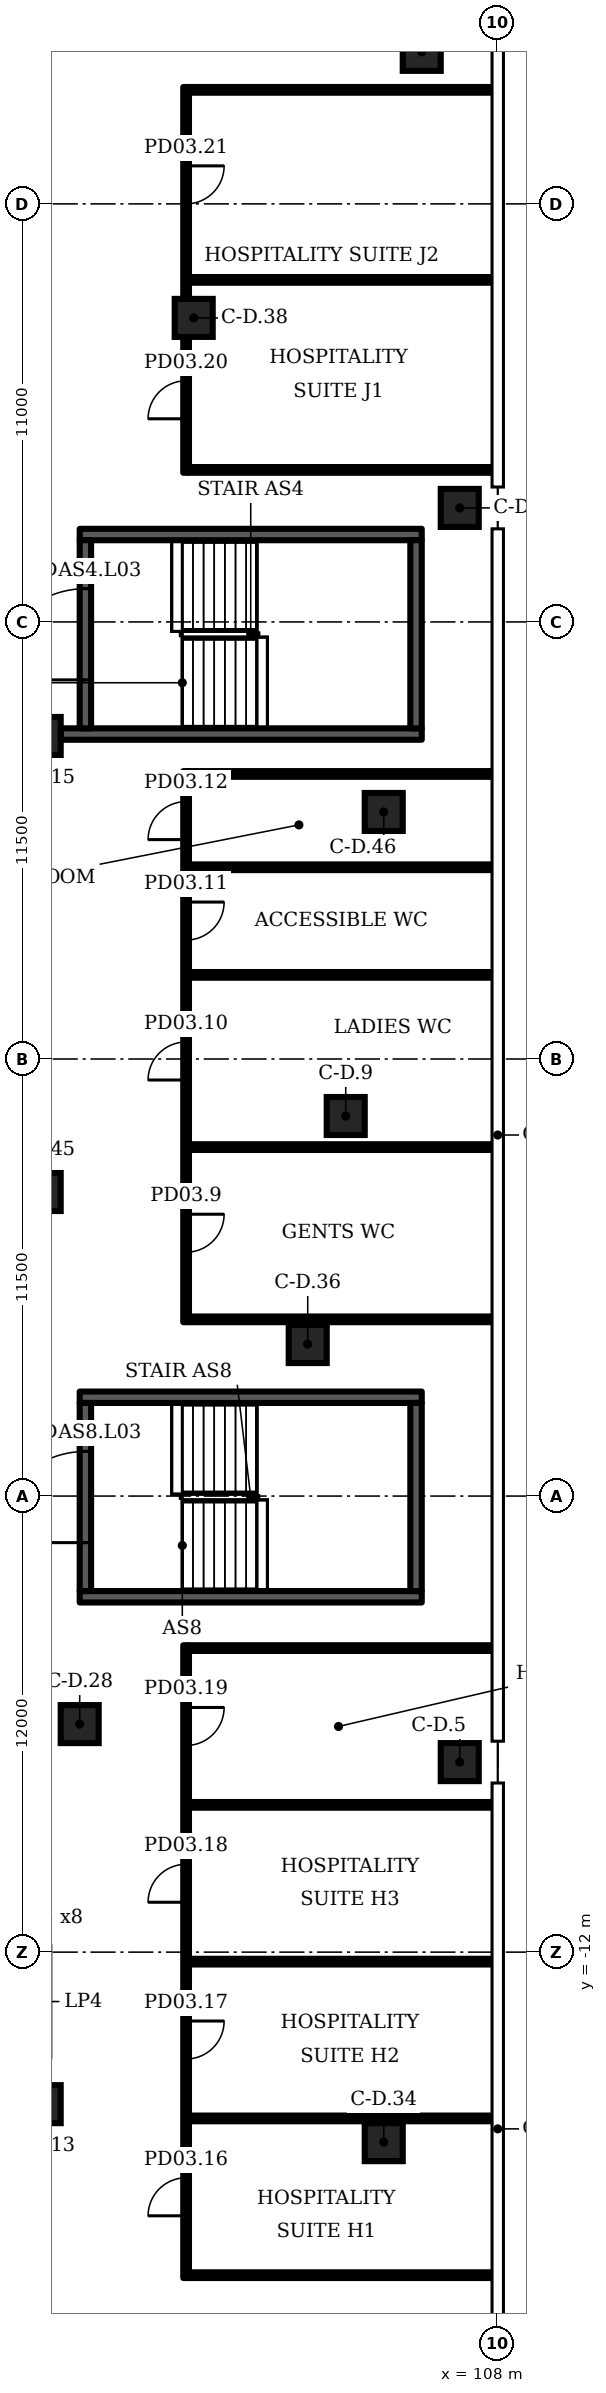
"""IFC4 building model, lengths in metres.
Left out: names, types, materials, properties, quantities, classifications, styles, units other than length and angle.
Written with IfcOpenShell. Run it as: python <this file> out.ifc"""

import sys

from ifc_helpers import new_model, si_unit, direction, frame, frame_2d, origin, origin_2d, place, context, subcontext, project, spatial, rectangle, extrude, element, fill, save


model = new_model("IFC4")
c1 = context("Model", 3, precision=1e-05, world=origin(), true_north=direction((0.0, 1.0)))
c2 = subcontext(c1, "Body", "Model", "MODEL_VIEW")
j1 = project(units=[si_unit("LENGTHUNIT", "METRE"), si_unit("PLANEANGLEUNIT", "RADIAN")], contexts=[c1])
p1 = place(None, origin())
s1 = spatial("IfcSite", under=j1, at=p1, CompositionType="ELEMENT")
p2 = place(p1, origin())
s2 = spatial("IfcBuilding", under=s1, at=p2, CompositionType="ELEMENT")
p3 = place(p2, frame((0.0, 0.0, 21.5)))
s3 = spatial("IfcBuildingStorey", under=s2, at=p3, CompositionType="ELEMENT", Elevation=21.5)
for number, where, z_axis, x_axis in (
    (1, (107.0, 26.0, 0.0), (0.0, 0.0, 1.0), (1.0, 0.0, 0.0)),
    (2, (107.0, -7.0, 0.0), (0.0, 0.0, 1.0), (1.0, 0.0, 0.0)),
    (3, (104.0, 10.0, 0.0), (0.0, 0.0, 1.0), (1.0, 0.0, 0.0)),
    (4, (96.0, -16.0, 0.0), (0.0, 0.0, 1.0), (1.0, 0.0, 0.0)),
    (5, (96.0, 20.0, 0.0), (0.0, 0.0, 1.0), (1.0, 0.0, 0.0)),
    (6, (106.0, 38.0, 0.0), (0.0, 0.0, 1.0), (1.0, 0.0, 0.0)),
    (7, (97.0, -6.0, 0.0), (0.0, 0.0, 1.0), (1.0, 0.0, 0.0)),
    (8, (105.0, -17.0, 0.0), (0.0, 0.0, 1.0), (1.0, 0.0, 0.0)),
    (9, (103.0, 4.0, 0.0), (0.0, 0.0, 1.0), (1.0, 0.0, 0.0)),
    (10, (100.0, 31.0, 0.0), (0.0, 0.0, 1.0), (1.0, 0.0, 0.0)),
    (11, (96.0, 8.0, 0.0), (0.0, 0.0, 1.0), (1.0, 0.0, 0.0)),
    (12, (105.0, 18.0, 0.0), (0.0, 0.0, 1.0), (1.0, 0.0, 0.0)),
):
    element("IfcColumn", number, at=place(p3, frame(where, z_axis=z_axis, x_axis=x_axis)), inside=s3, PredefinedType="COLUMN", context=c2, shape_type="SweptSolid", body=[
        extrude(rectangle(XDim=1.0, YDim=1.0, at=origin_2d()), origin(), (0.0, 0.0, 1.0), 6.0),
    ])
for number, where, z_axis, x_axis in (
    (13, (99.875, -20.5, 0.0), (0.0, 0.0, 1.0), (1.0, 0.0, 0.0)),
    (14, (99.875, -16.375, 0.0), (0.0, 0.0, 1.0), (1.0, 0.0, 0.0)),
    (15, (99.875, -12.25, 0.0), (0.0, 0.0, 1.0), (1.0, 0.0, 0.0)),
    (16, (99.875, -8.125, 0.0), (0.0, 0.0, 1.0), (1.0, 0.0, 0.0)),
    (17, (99.875, -4.0, 0.0), (0.0, 0.0, 1.0), (1.0, 0.0, 0.0)),
    (18, (99.875, 19.0, 0.0), (0.0, 0.0, 1.0), (1.0, 0.0, 0.0)),
    (19, (99.875, 4.65, 0.0), (0.0, 0.0, 1.0), (1.0, 0.0, 0.0)),
    (20, (99.875, 9.182, 0.0), (0.0, 0.0, 1.0), (1.0, 0.0, 0.0)),
):
    element("IfcWall", number, at=place(p3, frame(where, z_axis=z_axis, x_axis=x_axis)), inside=s3, PredefinedType="PARTITIONING", context=c2, shape_type="SweptSolid", body=[
        extrude(rectangle(XDim=8.02, YDim=0.15, at=frame_2d((4.01, 0.0))), origin(), (0.0, 0.0, 1.0), 5.7),
    ])
p4 = place(p3, frame((99.8, -20.575, 0.0), z_axis=(0.0, 0.0, 1.0), x_axis=(0.0, 1.0, 0.0)))
e21 = element("IfcWall", 21, at=p4, inside=s3, PredefinedType="PARTITIONING", context=c2, shape_type="SweptSolid", body=[
    extrude(rectangle(XDim=16.65, YDim=0.15, at=frame_2d((8.325, 0.0))), origin(), (0.0, 0.0, 1.0), 5.7),
])
p5 = place(p4, frame((1.637, 0.0, 0.0)))
e22 = element("IfcOpeningElement", 22, at=p5, cuts=e21, PredefinedType="OPENING", context=c2, shape_type="SweptSolid", body=[
    extrude(rectangle(XDim=1.0, YDim=2.1, at=frame_2d((0.5, 1.05))), frame((0.0, 0.085, 0.0), z_axis=(0.0, -1.0, 0.0), x_axis=(1.0, 0.0, 0.0)), (0.0, 0.0, 1.0), 0.17),
])
p6 = place(p4, frame((5.762, 0.0, 0.0)))
e23 = element("IfcOpeningElement", 23, at=p6, cuts=e21, PredefinedType="OPENING", context=c2, shape_type="SweptSolid", body=[
    extrude(rectangle(XDim=1.0, YDim=2.1, at=frame_2d((0.5, 1.05))), frame((0.0, 0.085, 0.0), z_axis=(0.0, -1.0, 0.0), x_axis=(1.0, 0.0, 0.0)), (0.0, 0.0, 1.0), 0.17),
])
p7 = place(p4, frame((9.887, 0.0, 0.0)))
e24 = element("IfcOpeningElement", 24, at=p7, cuts=e21, PredefinedType="OPENING", context=c2, shape_type="SweptSolid", body=[
    extrude(rectangle(XDim=1.0, YDim=2.1, at=frame_2d((0.5, 1.05))), frame((0.0, 0.085, 0.0), z_axis=(0.0, -1.0, 0.0), x_axis=(1.0, 0.0, 0.0)), (0.0, 0.0, 1.0), 0.17),
])
p8 = place(p4, frame((14.012, 0.0, 0.0)))
e25 = element("IfcOpeningElement", 25, at=p8, cuts=e21, PredefinedType="OPENING", context=c2, shape_type="SweptSolid", body=[
    extrude(rectangle(XDim=1.0, YDim=2.1, at=frame_2d((0.5, 1.05))), frame((0.0, 0.085, 0.0), z_axis=(0.0, -1.0, 0.0), x_axis=(1.0, 0.0, 0.0)), (0.0, 0.0, 1.0), 0.17),
])
p9 = place(p3, frame((99.8, 4.575, 0.0), z_axis=(0.0, 0.0, 1.0), x_axis=(0.0, 1.0, 0.0)))
e26 = element("IfcWall", 26, at=p9, inside=s3, PredefinedType="PARTITIONING", context=c2, shape_type="SweptSolid", body=[
    extrude(rectangle(XDim=14.5, YDim=0.15, at=frame_2d((7.25, 0.0))), origin(), (0.0, 0.0, 1.0), 5.7),
])
p10 = place(p9, frame((1.841, 0.0, 0.0)))
e27 = element("IfcOpeningElement", 27, at=p10, cuts=e26, PredefinedType="OPENING", context=c2, shape_type="SweptSolid", body=[
    extrude(rectangle(XDim=1.0, YDim=2.1, at=frame_2d((0.5, 1.05))), frame((0.0, 0.085, 0.0), z_axis=(0.0, -1.0, 0.0), x_axis=(1.0, 0.0, 0.0)), (0.0, 0.0, 1.0), 0.17),
])
p11 = place(p9, frame((6.372, 0.0, 0.0)))
e28 = element("IfcOpeningElement", 28, at=p11, cuts=e26, PredefinedType="OPENING", context=c2, shape_type="SweptSolid", body=[
    extrude(rectangle(XDim=1.0, YDim=2.1, at=frame_2d((0.5, 1.05))), frame((0.0, 0.085, 0.0), z_axis=(0.0, -1.0, 0.0), x_axis=(1.0, 0.0, 0.0)), (0.0, 0.0, 1.0), 0.17),
])
p12 = place(p9, frame((10.054, 0.0, 0.0)))
e29 = element("IfcOpeningElement", 29, at=p12, cuts=e26, PredefinedType="OPENING", context=c2, shape_type="SweptSolid", body=[
    extrude(rectangle(XDim=1.0, YDim=2.1, at=frame_2d((0.5, 1.05))), frame((0.0, 0.085, 0.0), z_axis=(0.0, -1.0, 0.0), x_axis=(1.0, 0.0, 0.0)), (0.0, 0.0, 1.0), 0.17),
])
p13 = place(p9, frame((12.698, 0.0, 0.0)))
e30 = element("IfcOpeningElement", 30, at=p13, cuts=e26, PredefinedType="OPENING", context=c2, shape_type="SweptSolid", body=[
    extrude(rectangle(XDim=1.0, YDim=2.1, at=frame_2d((0.5, 1.05))), frame((0.0, 0.085, 0.0), z_axis=(0.0, -1.0, 0.0), x_axis=(1.0, 0.0, 0.0)), (0.0, 0.0, 1.0), 0.17),
])
p14 = place(p3, frame((99.8, 26.925, 0.0), z_axis=(0.0, 0.0, 1.0), x_axis=(0.0, 1.0, 0.0)))
e31 = element("IfcWall", 31, at=p14, inside=s3, PredefinedType="PARTITIONING", context=c2, shape_type="SweptSolid", body=[
    extrude(rectangle(XDim=3.565, YDim=0.15, at=frame_2d((1.782, 0.0))), origin(), (0.0, 0.0, 1.0), 5.7),
])
p15 = place(p14, frame((1.42, 0.0, 0.0)))
e32 = element("IfcOpeningElement", 32, at=p15, cuts=e31, PredefinedType="OPENING", context=c2, shape_type="SweptSolid", body=[
    extrude(rectangle(XDim=1.0, YDim=2.1, at=frame_2d((0.5, 1.05))), frame((0.0, 0.085, 0.0), z_axis=(0.0, -1.0, 0.0), x_axis=(1.0, 0.0, 0.0)), (0.0, 0.0, 1.0), 0.17),
])
p16 = place(p3, frame((99.8, 31.51, 0.0), z_axis=(0.0, 0.0, 1.0), x_axis=(0.0, 1.0, 0.0)))
e33 = element("IfcWall", 33, at=p16, inside=s3, PredefinedType="PARTITIONING", context=c2, shape_type="SweptSolid", body=[
    extrude(rectangle(XDim=5.565, YDim=0.15, at=frame_2d((2.782, 0.0))), origin(), (0.0, 0.0, 1.0), 5.7),
])
p17 = place(p16, frame((2.49, 0.0, 0.0)))
e34 = element("IfcOpeningElement", 34, at=p17, cuts=e33, PredefinedType="OPENING", context=c2, shape_type="SweptSolid", body=[
    extrude(rectangle(XDim=1.0, YDim=2.1, at=frame_2d((0.5, 1.05))), frame((0.0, 0.085, 0.0), z_axis=(0.0, -1.0, 0.0), x_axis=(1.0, 0.0, 0.0)), (0.0, 0.0, 1.0), 0.17),
])
for number, where, z_axis, x_axis in (
    (35, (99.875, 13.713, 0.0), (0.0, 0.0, 1.0), (1.0, 0.0, 0.0)),
    (36, (99.875, 16.545, 0.0), (0.0, 0.0, 1.0), (1.0, 0.0, 0.0)),
    (37, (99.875, 27.0, 0.0), (0.0, 0.0, 1.0), (1.0, 0.0, 0.0)),
    (38, (99.875, 32.0, 0.0), (0.0, 0.0, 1.0), (1.0, 0.0, 0.0)),
    (39, (99.875, 37.0, 0.0), (0.0, 0.0, 1.0), (1.0, 0.0, 0.0)),
):
    element("IfcWall", number, at=place(p3, frame(where, z_axis=z_axis, x_axis=x_axis)), inside=s3, PredefinedType="PARTITIONING", context=c2, shape_type="SweptSolid", body=[
        extrude(rectangle(XDim=8.02, YDim=0.15, at=frame_2d((4.01, 0.0))), origin(), (0.0, 0.0, 1.0), 5.7),
    ])
for number, where, z_axis, x_axis in (
    (40, (97.0, -2.65, 0.0), (0.0, 0.0, 1.0), (1.0, 0.0, 0.0)),
    (41, (97.0, 2.6, 0.0), (0.0, 0.0, 1.0), (1.0, 0.0, 0.0)),
):
    element("IfcWall", number, at=place(p3, frame(where, z_axis=z_axis, x_axis=x_axis)), inside=s3, PredefinedType="SHEAR", context=c2, shape_type="SweptSolid", body=[
        extrude(rectangle(XDim=9.0, YDim=0.3, at=frame_2d((4.5, 0.0))), origin(), (0.0, 0.0, 1.0), 5.7),
    ])
p18 = place(p3, frame((97.15, -2.5, 0.0), z_axis=(0.0, 0.0, 1.0), x_axis=(0.0, 1.0, 0.0)))
e42 = element("IfcWall", 42, at=p18, inside=s3, PredefinedType="SHEAR", context=c2, shape_type="SweptSolid", body=[
    extrude(rectangle(XDim=4.95, YDim=0.3, at=frame_2d((2.475, 0.0))), origin(), (0.0, 0.0, 1.0), 5.7),
])
p19 = place(p18, frame((1.275, 0.0, 0.0)))
e43 = element("IfcOpeningElement", 43, at=p19, cuts=e42, PredefinedType="OPENING", context=c2, shape_type="SweptSolid", body=[
    extrude(rectangle(XDim=2.4, YDim=2.1, at=frame_2d((1.2, 1.05))), frame((0.0, 0.16, 0.0), z_axis=(0.0, -1.0, 0.0), x_axis=(1.0, 0.0, 0.0)), (0.0, 0.0, 1.0), 0.32),
])
p20 = place(p3, frame((105.85, -2.5, 0.0), z_axis=(0.0, 0.0, 1.0), x_axis=(0.0, 1.0, 0.0)))
e44 = element("IfcWall", 44, at=p20, inside=s3, PredefinedType="SHEAR", context=c2, shape_type="SweptSolid", body=[
    extrude(rectangle(XDim=4.95, YDim=0.3, at=frame_2d((2.475, 0.0))), origin(), (0.0, 0.0, 1.0), 5.7),
])
p21 = place(p3, frame((96.5, 20.05, 0.0), z_axis=(0.0, 0.0, 1.0), x_axis=(1.0, 0.0, 0.0)))
e45 = element("IfcWall", 45, at=p21, inside=s3, PredefinedType="SHEAR", context=c2, shape_type="SweptSolid", body=[
    extrude(rectangle(XDim=9.5, YDim=0.3, at=frame_2d((4.75, 0.0))), origin(), (0.0, 0.0, 1.0), 5.7),
])
p22 = place(p3, frame((97.0, 25.3, 0.0), z_axis=(0.0, 0.0, 1.0), x_axis=(1.0, 0.0, 0.0)))
e46 = element("IfcWall", 46, at=p22, inside=s3, PredefinedType="SHEAR", context=c2, shape_type="SweptSolid", body=[
    extrude(rectangle(XDim=9.0, YDim=0.3, at=frame_2d((4.5, 0.0))), origin(), (0.0, 0.0, 1.0), 5.7),
])
p23 = place(p3, frame((97.15, 20.2, 0.0), z_axis=(0.0, 0.0, 1.0), x_axis=(0.0, 1.0, 0.0)))
e47 = element("IfcWall", 47, at=p23, inside=s3, PredefinedType="SHEAR", context=c2, shape_type="SweptSolid", body=[
    extrude(rectangle(XDim=4.95, YDim=0.3, at=frame_2d((2.475, 0.0))), origin(), (0.0, 0.0, 1.0), 5.7),
])
p24 = place(p23, frame((1.275, 0.0, 0.0)))
e48 = element("IfcOpeningElement", 48, at=p24, cuts=e47, PredefinedType="OPENING", context=c2, shape_type="SweptSolid", body=[
    extrude(rectangle(XDim=2.4, YDim=2.1, at=frame_2d((1.2, 1.05))), frame((0.0, 0.16, 0.0), z_axis=(0.0, -1.0, 0.0), x_axis=(1.0, 0.0, 0.0)), (0.0, 0.0, 1.0), 0.32),
])
p25 = place(p3, frame((105.85, 20.2, 0.0), z_axis=(0.0, 0.0, 1.0), x_axis=(0.0, 1.0, 0.0)))
e49 = element("IfcWall", 49, at=p25, inside=s3, PredefinedType="SHEAR", context=c2, shape_type="SweptSolid", body=[
    extrude(rectangle(XDim=4.95, YDim=0.3, at=frame_2d((2.475, 0.0))), origin(), (0.0, 0.0, 1.0), 5.7),
])
p26 = place(p10, origin())
e50 = element("IfcDoor", 50, at=p26, inside=s3, OperationType="SINGLE_SWING_RIGHT", PredefinedType="DOOR", context=c2, shape_type="SweptSolid", body=[
    extrude(rectangle(XDim=1.0, YDim=2.1, at=frame_2d((0.5, 1.05))), frame((0.0, 0.025, 0.0), z_axis=(0.0, -1.0, 0.0), x_axis=(1.0, 0.0, 0.0)), (0.0, 0.0, 1.0), 0.05),
])
fill(e27, e50)
p27 = place(p11, origin())
e51 = element("IfcDoor", 51, at=p27, inside=s3, OperationType="SINGLE_SWING_LEFT", PredefinedType="DOOR", context=c2, shape_type="SweptSolid", body=[
    extrude(rectangle(XDim=1.0, YDim=2.1, at=frame_2d((0.5, 1.05))), frame((0.0, 0.025, 0.0), z_axis=(0.0, -1.0, 0.0), x_axis=(1.0, 0.0, 0.0)), (0.0, 0.0, 1.0), 0.05),
])
fill(e28, e51)
p28 = place(p12, origin())
e52 = element("IfcDoor", 52, at=p28, inside=s3, OperationType="SINGLE_SWING_RIGHT", PredefinedType="DOOR", context=c2, shape_type="SweptSolid", body=[
    extrude(rectangle(XDim=1.0, YDim=2.1, at=frame_2d((0.5, 1.05))), frame((0.0, 0.025, 0.0), z_axis=(0.0, -1.0, 0.0), x_axis=(1.0, 0.0, 0.0)), (0.0, 0.0, 1.0), 0.05),
])
fill(e29, e52)
p29 = place(p13, origin())
e53 = element("IfcDoor", 53, at=p29, inside=s3, OperationType="SINGLE_SWING_LEFT", PredefinedType="DOOR", context=c2, shape_type="SweptSolid", body=[
    extrude(rectangle(XDim=1.0, YDim=2.1, at=frame_2d((0.5, 1.05))), frame((0.0, 0.025, 0.0), z_axis=(0.0, -1.0, 0.0), x_axis=(1.0, 0.0, 0.0)), (0.0, 0.0, 1.0), 0.05),
])
fill(e30, e53)
p30 = place(p5, origin())
e54 = element("IfcDoor", 54, at=p30, inside=s3, OperationType="SINGLE_SWING_LEFT", PredefinedType="DOOR", context=c2, shape_type="SweptSolid", body=[
    extrude(rectangle(XDim=1.0, YDim=2.1, at=frame_2d((0.5, 1.05))), frame((0.0, 0.025, 0.0), z_axis=(0.0, -1.0, 0.0), x_axis=(1.0, 0.0, 0.0)), (0.0, 0.0, 1.0), 0.05),
])
fill(e22, e54)
p31 = place(p6, origin())
e55 = element("IfcDoor", 55, at=p31, inside=s3, OperationType="SINGLE_SWING_RIGHT", PredefinedType="DOOR", context=c2, shape_type="SweptSolid", body=[
    extrude(rectangle(XDim=1.0, YDim=2.1, at=frame_2d((0.5, 1.05))), frame((0.0, 0.025, 0.0), z_axis=(0.0, -1.0, 0.0), x_axis=(1.0, 0.0, 0.0)), (0.0, 0.0, 1.0), 0.05),
])
fill(e23, e55)
p32 = place(p7, origin())
e56 = element("IfcDoor", 56, at=p32, inside=s3, OperationType="SINGLE_SWING_LEFT", PredefinedType="DOOR", context=c2, shape_type="SweptSolid", body=[
    extrude(rectangle(XDim=1.0, YDim=2.1, at=frame_2d((0.5, 1.05))), frame((0.0, 0.025, 0.0), z_axis=(0.0, -1.0, 0.0), x_axis=(1.0, 0.0, 0.0)), (0.0, 0.0, 1.0), 0.05),
])
fill(e24, e56)
p33 = place(p8, origin())
e57 = element("IfcDoor", 57, at=p33, inside=s3, OperationType="SINGLE_SWING_RIGHT", PredefinedType="DOOR", context=c2, shape_type="SweptSolid", body=[
    extrude(rectangle(XDim=1.0, YDim=2.1, at=frame_2d((0.5, 1.05))), frame((0.0, 0.025, 0.0), z_axis=(0.0, -1.0, 0.0), x_axis=(1.0, 0.0, 0.0)), (0.0, 0.0, 1.0), 0.05),
])
fill(e25, e57)
p34 = place(p15, origin())
e58 = element("IfcDoor", 58, at=p34, inside=s3, OperationType="SINGLE_SWING_LEFT", PredefinedType="DOOR", context=c2, shape_type="SweptSolid", body=[
    extrude(rectangle(XDim=1.0, YDim=2.1, at=frame_2d((0.5, 1.05))), frame((0.0, 0.025, 0.0), z_axis=(0.0, -1.0, 0.0), x_axis=(1.0, 0.0, 0.0)), (0.0, 0.0, 1.0), 0.05),
])
fill(e32, e58)
p35 = place(p17, origin())
e59 = element("IfcDoor", 59, at=p35, inside=s3, OperationType="SINGLE_SWING_RIGHT", PredefinedType="DOOR", context=c2, shape_type="SweptSolid", body=[
    extrude(rectangle(XDim=1.0, YDim=2.1, at=frame_2d((0.5, 1.05))), frame((0.0, 0.025, 0.0), z_axis=(0.0, -1.0, 0.0), x_axis=(1.0, 0.0, 0.0)), (0.0, 0.0, 1.0), 0.05),
])
fill(e34, e59)
p36 = place(p19, origin())
e60 = element("IfcDoor", 60, at=p36, inside=s3, OperationType="DOUBLE_DOOR_SINGLE_SWING", PredefinedType="DOOR", context=c2, shape_type="SweptSolid", body=[
    extrude(rectangle(XDim=2.4, YDim=2.1, at=frame_2d((1.2, 1.05))), frame((0.0, 0.025, 0.0), z_axis=(0.0, -1.0, 0.0), x_axis=(1.0, 0.0, 0.0)), (0.0, 0.0, 1.0), 0.05),
])
fill(e43, e60)
p37 = place(p24, origin())
e61 = element("IfcDoor", 61, at=p37, inside=s3, OperationType="DOUBLE_DOOR_SINGLE_SWING", PredefinedType="DOOR", context=c2, shape_type="SweptSolid", body=[
    extrude(rectangle(XDim=2.4, YDim=2.1, at=frame_2d((1.2, 1.05))), frame((0.0, 0.025, 0.0), z_axis=(0.0, -1.0, 0.0), x_axis=(1.0, 0.0, 0.0)), (0.0, 0.0, 1.0), 0.05),
])
fill(e48, e61)
save(model, sys.argv[1])
